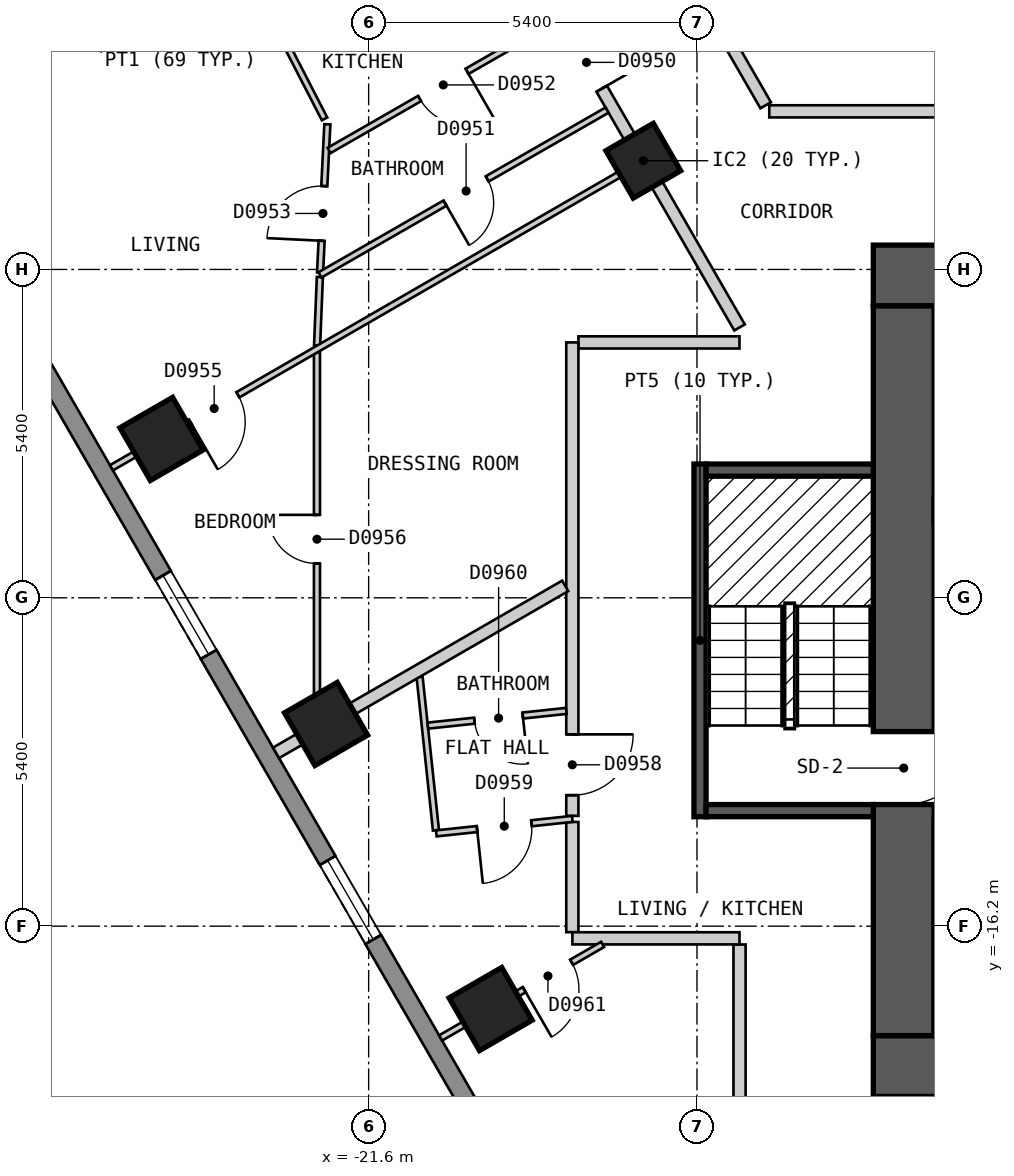
"""IFC4 building model, lengths in metres.
Left out: names, types, materials, properties, quantities, classifications, styles, units other than length and angle.
Written with IfcOpenShell. Run it as: python <this file> out.ifc"""

import sys

from ifc_helpers import new_model, si_unit, direction, frame, frame_2d, origin, origin_2d, place, context, subcontext, project, spatial, polyline, rectangle, outline, extrude, element, fill, save


model = new_model("IFC4")
c1 = context("Model", 3, precision=1e-05, world=origin(), true_north=direction((0.0, 1.0)))
c2 = subcontext(c1, "Body", "Model", "MODEL_VIEW")
j1 = project(units=[si_unit("LENGTHUNIT", "METRE"), si_unit("PLANEANGLEUNIT", "RADIAN")], contexts=[c1])
p1 = place(None, origin())
s1 = spatial("IfcSite", under=j1, at=p1, CompositionType="ELEMENT")
p2 = place(p1, origin())
s2 = spatial("IfcBuilding", under=s1, at=p2, CompositionType="ELEMENT")
p3 = place(p2, frame((0.0, 0.0, 90.0)))
s3 = spatial("IfcBuildingStorey", under=s2, at=p3, CompositionType="ELEMENT", Elevation=90.0)
for number, where, z_axis, x_axis in (
    (1, (-25.007, -8.187, 0.0), (0.0, 0.0, 1.0), (0.5, -0.866, 0.0)),
    (2, (-22.3, -12.875, 0.0), (0.0, 0.0, 1.0), (0.5, -0.866, 0.0)),
    (3, (-19.594, -17.563, 0.0), (0.0, 0.0, 1.0), (0.5, -0.866, 0.0)),
):
    element("IfcColumn", number, at=place(p3, frame(where, z_axis=z_axis, x_axis=x_axis)), inside=s3, PredefinedType="COLUMN", context=c2, shape_type="SweptSolid", body=[
        extrude(rectangle(XDim=1.0, YDim=1.0, at=origin_2d()), origin(), (0.0, 0.0, 1.0), 3.0),
    ])
p4 = place(p3, frame((-17.083, -3.612, 0.0), z_axis=(0.0, 0.0, 1.0), x_axis=(0.5, -0.866025403784, 0.0)))
e4 = element("IfcColumn", 4, at=p4, inside=s3, PredefinedType="COLUMN", context=c2, shape_type="SweptSolid", body=[
    extrude(rectangle(XDim=0.9, YDim=0.9, at=origin_2d()), origin(), (0.0, 0.0, 1.0), 3.0),
])
p5 = place(p3, frame((-13.3, -18.5, 0.0), z_axis=(0.0, 0.0, 1.0), x_axis=(1.0, 0.0, 0.0)))
e5 = element("IfcWall", 5, at=p5, inside=s3, PredefinedType="SHEAR", context=c2, shape_type="SweptSolid", body=[
    extrude(rectangle(XDim=26.6, YDim=1.0, at=frame_2d((13.3, 0.0))), origin(), (0.0, 0.0, 1.0), 2.7),
])
p6 = place(p3, frame((-13.3, -5.5, 0.0), z_axis=(0.0, 0.0, 1.0), x_axis=(1.0, 0.0, 0.0)))
e6 = element("IfcWall", 6, at=p6, inside=s3, PredefinedType="SHEAR", context=c2, shape_type="SweptSolid", body=[
    extrude(rectangle(XDim=26.6, YDim=1.0, at=frame_2d((13.3, 0.0))), origin(), (0.0, 0.0, 1.0), 2.7),
])
p7 = place(p6, frame((23.65, 0.0, 0.0)))
e7 = element("IfcOpeningElement", 7, at=p7, cuts=e6, PredefinedType="OPENING", context=c2, shape_type="SweptSolid", body=[
    extrude(rectangle(XDim=1.2, YDim=2.1, at=frame_2d((0.6, 1.05))), frame((0.0, 0.51, 0.0), z_axis=(0.0, -1.0, 0.0), x_axis=(1.0, 0.0, 0.0)), (0.0, 0.0, 1.0), 1.02),
])
p8 = place(p3, frame((-12.8, -18.0, 0.0), z_axis=(0.0, 0.0, 1.0), x_axis=(0.0, 1.0, 0.0)))
e8 = element("IfcWall", 8, at=p8, inside=s3, PredefinedType="SHEAR", context=c2, shape_type="SweptSolid", body=[
    extrude(rectangle(XDim=12.0, YDim=1.0, at=frame_2d((6.0, 0.0))), origin(), (0.0, 0.0, 1.0), 2.7),
])
p9 = place(p8, frame((3.8, 0.0, 0.0)))
e9 = element("IfcOpeningElement", 9, at=p9, cuts=e8, PredefinedType="OPENING", context=c2, shape_type="SweptSolid", body=[
    extrude(rectangle(XDim=1.2, YDim=2.1, at=frame_2d((0.6, 1.05))), frame((0.0, 0.51, 0.0), z_axis=(0.0, -1.0, 0.0), x_axis=(1.0, 0.0, 0.0)), (0.0, 0.0, 1.0), 1.02),
])
p10 = place(p3, frame((-29.027, -3.425, 0.0), z_axis=(0.0, 0.0, 1.0), x_axis=(0.500035407905, -0.866004960056, 0.0)))
e10 = element("IfcWall", 10, at=p10, inside=s3, PredefinedType="SOLIDWALL", context=c2, shape_type="SweptSolid", body=[
    extrude(outline(polyline([(0.0, -0.15), (23.094, -0.15), (23.014, 0.15), (0.08, 0.15), (0.0, -0.15)])), origin(), (0.0, 0.0, 1.0), 2.7),
])
p11 = place(p10, frame((2.677, 0.0, 0.15)))
e11 = element("IfcOpeningElement", 11, at=p11, cuts=e10, PredefinedType="OPENING", context=c2, shape_type="SweptSolid", body=[
    extrude(rectangle(XDim=1.5, YDim=2.1, at=frame_2d((0.75, 1.05))), frame((0.0, 0.16, 0.0), z_axis=(0.0, -1.0, 0.0), x_axis=(1.0, 0.0, 0.0)), (0.0, 0.0, 1.0), 0.32),
])
p12 = place(p10, frame((8.091, 0.0, 0.15)))
e12 = element("IfcOpeningElement", 12, at=p12, cuts=e10, PredefinedType="OPENING", context=c2, shape_type="SweptSolid", body=[
    extrude(rectangle(XDim=1.5, YDim=2.1, at=frame_2d((0.75, 1.05))), frame((0.0, 0.16, 0.0), z_axis=(0.0, -1.0, 0.0), x_axis=(1.0, 0.0, 0.0)), (0.0, 0.0, 1.0), 0.32),
])
p13 = place(p10, frame((13.504, 0.0, 0.15)))
e13 = element("IfcOpeningElement", 13, at=p13, cuts=e10, PredefinedType="OPENING", context=c2, shape_type="SweptSolid", body=[
    extrude(rectangle(XDim=1.5, YDim=2.1, at=frame_2d((0.75, 1.05))), frame((0.0, 0.16, 0.0), z_axis=(0.0, -1.0, 0.0), x_axis=(1.0, 0.0, 0.0)), (0.0, 0.0, 1.0), 0.32),
])
p14 = place(p10, frame((18.917, 0.0, 0.15)))
e14 = element("IfcOpeningElement", 14, at=p14, cuts=e10, PredefinedType="OPENING", context=c2, shape_type="SweptSolid", body=[
    extrude(rectangle(XDim=1.5, YDim=2.1, at=frame_2d((0.75, 1.05))), frame((0.0, 0.16, 0.0), z_axis=(0.0, -1.0, 0.0), x_axis=(1.0, 0.0, 0.0)), (0.0, 0.0, 1.0), 0.32),
])
p15 = place(p3, frame((-15.993, -1.101, 0.0), z_axis=(0.0, 0.0, 1.0), x_axis=(0.499894174133, -0.866086493757, 0.0)))
e15 = element("IfcWall", 15, at=p15, inside=s3, PredefinedType="PARTITIONING", context=c2, shape_type="SweptSolid", body=[
    extrude(rectangle(XDim=1.846, YDim=0.2, at=frame_2d((0.923, 0.0))), origin(), (0.0, 0.0, 1.0), 2.7),
])
p16 = place(p3, frame((-18.533, -1.101, 0.0), z_axis=(0.0, 0.0, 1.0), x_axis=(0.500022085096, -0.866012652573, 0.0)))
e16 = element("IfcWall", 16, at=p16, inside=s3, PredefinedType="PARTITIONING", context=c2, shape_type="SweptSolid", body=[
    extrude(rectangle(XDim=6.066, YDim=0.2, at=frame_2d((3.033, 0.0))), origin(), (0.0, 0.0, 1.0), 2.7),
])
p17 = place(p16, frame((0.532, 0.0, 0.0)))
e17 = element("IfcOpeningElement", 17, at=p17, cuts=e16, PredefinedType="OPENING", context=c2, shape_type="SweptSolid", body=[
    extrude(rectangle(XDim=1.0, YDim=2.1, at=frame_2d((0.5, 1.05))), frame((0.0, 0.11, 0.0), z_axis=(0.0, -1.0, 0.0), x_axis=(1.0, 0.0, 0.0)), (0.0, 0.0, 1.0), 0.22),
])
p18 = place(p3, frame((-15.5, -16.501, 0.0), z_axis=(0.0, 0.0, 1.0), x_axis=(0.0, -1.0, 0.0)))
e18 = element("IfcWall", 18, at=p18, inside=s3, PredefinedType="PARTITIONING", context=c2, shape_type="SweptSolid", body=[
    extrude(rectangle(XDim=4.598, YDim=0.2, at=frame_2d((2.299, 0.0))), origin(), (0.0, 0.0, 1.0), 2.7),
])
p19 = place(p3, frame((-18.25, -14.486, 0.0), z_axis=(0.0, 0.0, 1.0), x_axis=(0.0, -1.0, 0.0)))
e19 = element("IfcWall", 19, at=p19, inside=s3, PredefinedType="PARTITIONING", context=c2, shape_type="SweptSolid", body=[
    extrude(rectangle(XDim=1.813, YDim=0.2, at=frame_2d((0.906, 0.0))), origin(), (0.0, 0.0, 1.0), 2.7),
])
p20 = place(p3, frame((-18.15, -6.6, 0.0), z_axis=(0.0, 0.0, 1.0), x_axis=(1.0, 0.0, 0.0)))
e20 = element("IfcWall", 20, at=p20, inside=s3, PredefinedType="PARTITIONING", context=c2, shape_type="SweptSolid", body=[
    extrude(rectangle(XDim=2.649, YDim=0.2, at=frame_2d((1.324, 0.0))), origin(), (0.0, 0.0, 1.0), 2.7),
])
p21 = place(p3, frame((-18.249, -16.4, 0.0), z_axis=(0.0, 0.0, 1.0), x_axis=(1.0, 0.0, 0.0)))
e21 = element("IfcWall", 21, at=p21, inside=s3, PredefinedType="PARTITIONING", context=c2, shape_type="SweptSolid", body=[
    extrude(rectangle(XDim=2.748, YDim=0.2, at=frame_2d((1.374, 0.0))), origin(), (0.0, 0.0, 1.0), 2.7),
])
p22 = place(p3, frame((-15.011, -2.8, 0.0), z_axis=(0.0, 0.0, 1.0), x_axis=(1.0, 0.0, 0.0)))
e22 = element("IfcWall", 22, at=p22, inside=s3, PredefinedType="PARTITIONING", context=c2, shape_type="SweptSolid", body=[
    extrude(rectangle(XDim=7.982, YDim=0.2, at=frame_2d((3.991, 0.0))), origin(), (0.0, 0.0, 1.0), 2.7),
])
p23 = place(p3, frame((-18.25, -14.386, 0.0), z_axis=(0.0, 0.0, 1.0), x_axis=(0.0, 1.0, 0.0)))
e23 = element("IfcWall", 23, at=p23, inside=s3, PredefinedType="PARTITIONING", context=c2, shape_type="SweptSolid", body=[
    extrude(rectangle(XDim=7.786, YDim=0.2, at=frame_2d((3.893, 0.0))), origin(), (0.0, 0.0, 1.0), 2.7),
])
p24 = place(p23, frame((0.34, 0.0, 0.0)))
e24 = element("IfcOpeningElement", 24, at=p24, cuts=e23, PredefinedType="OPENING", context=c2, shape_type="SweptSolid", body=[
    extrude(rectangle(XDim=1.0, YDim=2.1, at=frame_2d((0.5, 1.05))), frame((0.0, 0.11, 0.0), z_axis=(0.0, -1.0, 0.0), x_axis=(1.0, 0.0, 0.0)), (0.0, 0.0, 1.0), 0.22),
])
p25 = place(p3, frame((-23.289, -1.054, 0.0), z_axis=(0.0, 0.0, 1.0), x_axis=(0.458226112305, -0.888835659726, 0.0)))
e25 = element("IfcWall", 25, at=p25, inside=s3, PredefinedType="PARTITIONING", context=c2, shape_type="SweptSolid", body=[
    extrude(rectangle(XDim=2.104, YDim=0.1, at=frame_2d((1.052, 0.0))), origin(), (0.0, 0.0, 1.0), 2.7),
])
p26 = place(p3, frame((-20.762, -12.102, 0.0), z_axis=(0.0, 0.0, 1.0), x_axis=(0.106118300401, -0.994353511745, 0.0)))
e26 = element("IfcWall", 26, at=p26, inside=s3, PredefinedType="PARTITIONING", context=c2, shape_type="SweptSolid", body=[
    extrude(rectangle(XDim=2.535, YDim=0.1, at=frame_2d((1.268, 0.0))), origin(), (0.0, 0.0, 1.0), 2.7),
])
p27 = place(p3, frame((-20.626, -12.902, 0.0), z_axis=(0.0, 0.0, 1.0), x_axis=(0.994385570266, 0.105817473257, 0.0)))
e27 = element("IfcWall", 27, at=p27, inside=s3, PredefinedType="PARTITIONING", context=c2, shape_type="SweptSolid", body=[
    extrude(rectangle(XDim=2.289, YDim=0.1, at=frame_2d((1.145, 0.0))), origin(), (0.0, 0.0, 1.0), 2.7),
])
p28 = place(p27, frame((0.77, 0.0, 0.0)))
e28 = element("IfcOpeningElement", 28, at=p28, cuts=e27, PredefinedType="OPENING", context=c2, shape_type="SweptSolid", body=[
    extrude(rectangle(XDim=0.8, YDim=2.1, at=frame_2d((0.4, 1.05))), frame((0.0, 0.06, 0.0), z_axis=(0.0, -1.0, 0.0), x_axis=(1.0, 0.0, 0.0)), (0.0, 0.0, 1.0), 0.12),
])
p29 = place(p3, frame((-20.487, -14.674, 0.0), z_axis=(0.0, 0.0, 1.0), x_axis=(0.994386484046, 0.105808885948, 0.0)))
e29 = element("IfcWall", 29, at=p29, inside=s3, PredefinedType="PARTITIONING", context=c2, shape_type="SweptSolid", body=[
    extrude(rectangle(XDim=2.25, YDim=0.1, at=frame_2d((1.125, 0.0))), origin(), (0.0, 0.0, 1.0), 2.7),
])
p30 = place(p29, frame((0.674, 0.0, 0.0)))
e30 = element("IfcOpeningElement", 30, at=p30, cuts=e29, PredefinedType="OPENING", context=c2, shape_type="SweptSolid", body=[
    extrude(rectangle(XDim=0.9, YDim=2.1, at=frame_2d((0.45, 1.05))), frame((0.0, 0.06, 0.0), z_axis=(0.0, -1.0, 0.0), x_axis=(1.0, 0.0, 0.0)), (0.0, 0.0, 1.0), 0.12),
])
p31 = place(p3, frame((-22.399, -5.45, 0.0), z_axis=(0.0, 0.0, 1.0), x_axis=(0.049129140995, 0.998792434646, 0.0)))
e31 = element("IfcWall", 31, at=p31, inside=s3, PredefinedType="PARTITIONING", context=c2, shape_type="SweptSolid", body=[
    extrude(rectangle(XDim=2.44, YDim=0.1, at=frame_2d((1.22, 0.0))), origin(), (0.0, 0.0, 1.0), 2.7),
])
p32 = place(p31, frame((0.522, 0.0, 0.0)))
e32 = element("IfcOpeningElement", 32, at=p32, cuts=e31, PredefinedType="OPENING", context=c2, shape_type="SweptSolid", body=[
    extrude(rectangle(XDim=0.9, YDim=2.1, at=frame_2d((0.45, 1.05))), frame((0.0, 0.06, 0.0), z_axis=(0.0, -1.0, 0.0), x_axis=(1.0, 0.0, 0.0)), (0.0, 0.0, 1.0), 0.12),
])
p33 = place(p3, frame((-22.448, -6.651, 0.0), z_axis=(0.0, 0.0, 1.0), x_axis=(0.040729401597, 0.99917021365, 0.0)))
e33 = element("IfcWall", 33, at=p33, inside=s3, PredefinedType="PARTITIONING", context=c2, shape_type="SweptSolid", body=[
    extrude(rectangle(XDim=1.127, YDim=0.1, at=frame_2d((0.563, 0.0))), origin(), (0.0, 0.0, 1.0), 2.7),
])
p34 = place(p3, frame((-22.45, -12.846, 0.0), z_axis=(0.0, 0.0, 1.0), x_axis=(0.0, 1.0, 0.0)))
e34 = element("IfcWall", 34, at=p34, inside=s3, PredefinedType="PARTITIONING", context=c2, shape_type="SweptSolid", body=[
    extrude(rectangle(XDim=6.078, YDim=0.1, at=frame_2d((3.039, 0.0))), origin(), (0.0, 0.0, 1.0), 2.7),
])
p35 = place(p34, frame((2.61, 0.0, 0.0)))
e35 = element("IfcOpeningElement", 35, at=p35, cuts=e34, PredefinedType="OPENING", context=c2, shape_type="SweptSolid", body=[
    extrude(rectangle(XDim=0.8, YDim=2.1, at=frame_2d((0.4, 1.05))), frame((0.0, 0.06, 0.0), z_axis=(0.0, -1.0, 0.0), x_axis=(1.0, 0.0, 0.0)), (0.0, 0.0, 1.0), 0.12),
])
p36 = place(p3, frame((-20.416, -18.038, 0.0), z_axis=(0.0, 0.0, 1.0), x_axis=(0.866026989333, 0.499997253739, 0.0)))
e36 = element("IfcWall", 36, at=p36, inside=s3, PredefinedType="PARTITIONING", context=c2, shape_type="SweptSolid", body=[
    extrude(rectangle(XDim=3.076, YDim=0.1, at=frame_2d((1.538, 0.0))), origin(), (0.0, 0.0, 1.0), 2.7),
])
p37 = place(p36, frame((1.588, 0.0, 0.0)))
e37 = element("IfcOpeningElement", 37, at=p37, cuts=e36, PredefinedType="OPENING", context=c2, shape_type="SweptSolid", body=[
    extrude(rectangle(XDim=0.9, YDim=2.1, at=frame_2d((0.45, 1.05))), frame((0.0, 0.06, 0.0), z_axis=(0.0, -1.0, 0.0), x_axis=(1.0, 0.0, 0.0)), (0.0, 0.0, 1.0), 0.12),
])
p38 = place(p3, frame((-25.83, -8.662, 0.0), z_axis=(0.0, 0.0, 1.0), x_axis=(0.866022959057, 0.500004234368, 0.0)))
e38 = element("IfcWall", 38, at=p38, inside=s3, PredefinedType="PARTITIONING", context=c2, shape_type="SweptSolid", body=[
    extrude(rectangle(XDim=10.0, YDim=0.1, at=frame_2d((5.0, 0.0))), origin(), (0.0, 0.0, 1.0), 2.7),
])
p39 = place(p38, frame((1.501, 0.0, 0.0)))
e39 = element("IfcOpeningElement", 39, at=p39, cuts=e38, PredefinedType="OPENING", context=c2, shape_type="SweptSolid", body=[
    extrude(rectangle(XDim=0.9, YDim=2.1, at=frame_2d((0.45, 1.05))), frame((0.0, 0.06, 0.0), z_axis=(0.0, -1.0, 0.0), x_axis=(1.0, 0.0, 0.0)), (0.0, 0.0, 1.0), 0.12),
])
p40 = place(p3, frame((-22.401, -5.49, 0.0), z_axis=(0.0, 0.0, 1.0), x_axis=(0.867314404256, 0.497760709749, 0.0)))
e40 = element("IfcWall", 40, at=p40, inside=s3, PredefinedType="PARTITIONING", context=c2, shape_type="SweptSolid", body=[
    extrude(rectangle(XDim=5.444, YDim=0.1, at=frame_2d((2.722, 0.0))), origin(), (0.0, 0.0, 1.0), 2.7),
])
p41 = place(p40, frame((2.372, 0.0, 0.0)))
e41 = element("IfcOpeningElement", 41, at=p41, cuts=e40, PredefinedType="OPENING", context=c2, shape_type="SweptSolid", body=[
    extrude(rectangle(XDim=0.8, YDim=2.1, at=frame_2d((0.4, 1.05))), frame((0.0, 0.06, 0.0), z_axis=(0.0, -1.0, 0.0), x_axis=(1.0, 0.0, 0.0)), (0.0, 0.0, 1.0), 0.12),
])
p42 = place(p3, frame((-22.25, -3.443, 0.0), z_axis=(0.0, 0.0, 1.0), x_axis=(0.867362741349, 0.497676476156, 0.0)))
e42 = element("IfcWall", 42, at=p42, inside=s3, PredefinedType="PARTITIONING", context=c2, shape_type="SweptSolid", body=[
    extrude(rectangle(XDim=4.29, YDim=0.1, at=frame_2d((2.145, 0.0))), origin(), (0.0, 0.0, 1.0), 2.7),
])
p43 = place(p42, frame((1.715, 0.0, 0.0)))
e43 = element("IfcOpeningElement", 43, at=p43, cuts=e42, PredefinedType="OPENING", context=c2, shape_type="SweptSolid", body=[
    extrude(rectangle(XDim=0.9, YDim=2.1, at=frame_2d((0.45, 1.05))), frame((0.0, 0.06, 0.0), z_axis=(0.0, -1.0, 0.0), x_axis=(1.0, 0.0, 0.0)), (0.0, 0.0, 1.0), 0.12),
])
p44 = place(p3, frame((-23.123, -13.35, 0.0), z_axis=(0.0, 0.0, 1.0), x_axis=(0.866013095437, 0.500021318078, 0.0)))
e44 = element("IfcWall", 44, at=p44, inside=s3, PredefinedType="PARTITIONING", context=c2, shape_type="SweptSolid", body=[
    extrude(rectangle(XDim=5.492, YDim=0.2, at=frame_2d((2.746, 0.0))), origin(), (0.0, 0.0, 1.0), 2.7),
])
p45 = place(p3, frame((-16.15, -14.4, 0.0), z_axis=(0.0, 0.0, 1.0), x_axis=(0.0, 1.0, 0.0)))
e45 = element("IfcWall", 45, at=p45, inside=s3, PredefinedType="SOLIDWALL", context=c2, shape_type="SweptSolid", body=[
    extrude(rectangle(XDim=5.8, YDim=0.2, at=frame_2d((2.9, 0.0))), origin(), (0.0, 0.0, 1.0), 2.7),
])
for number, where, z_axis, x_axis in (
    (46, (-16.05, -14.3, 0.0), (0.0, 0.0, 1.0), (1.0, 0.0, 0.0)),
    (47, (-16.05, -8.7, 0.0), (0.0, 0.0, 1.0), (1.0, 0.0, 0.0)),
):
    element("IfcWall", number, at=place(p3, frame(where, z_axis=z_axis, x_axis=x_axis)), inside=s3, PredefinedType="SOLIDWALL", context=c2, shape_type="SweptSolid", body=[
        extrude(rectangle(XDim=2.75, YDim=0.2, at=frame_2d((1.375, 0.0))), origin(), (0.0, 0.0, 1.0), 2.7),
    ])
p46 = place(p12, origin())
e48 = element("IfcWindow", 48, at=p46, inside=s3, PartitioningType="SINGLE_PANEL", PredefinedType="WINDOW", context=c2, shape_type="SweptSolid", body=[
    extrude(rectangle(XDim=1.5, YDim=2.1, at=frame_2d((0.75, 1.05))), frame((0.0, 0.03, 0.0), z_axis=(0.0, -1.0, 0.0), x_axis=(1.0, 0.0, 0.0)), (0.0, 0.0, 1.0), 0.06),
])
fill(e12, e48)
p47 = place(p13, origin())
e49 = element("IfcWindow", 49, at=p47, inside=s3, PartitioningType="SINGLE_PANEL", PredefinedType="WINDOW", context=c2, shape_type="SweptSolid", body=[
    extrude(rectangle(XDim=1.5, YDim=2.1, at=frame_2d((0.75, 1.05))), frame((0.0, 0.03, 0.0), z_axis=(0.0, -1.0, 0.0), x_axis=(1.0, 0.0, 0.0)), (0.0, 0.0, 1.0), 0.06),
])
fill(e13, e49)
p48 = place(p17, origin())
e50 = element("IfcDoor", 50, at=p48, inside=s3, OperationType="SINGLE_SWING_RIGHT", PredefinedType="DOOR", context=c2, shape_type="SweptSolid", body=[
    extrude(rectangle(XDim=1.0, YDim=2.1, at=frame_2d((0.5, 1.05))), frame((0.0, 0.025, 0.0), z_axis=(0.0, -1.0, 0.0), x_axis=(1.0, 0.0, 0.0)), (0.0, 0.0, 1.0), 0.05),
])
fill(e17, e50)
p49 = place(p41, origin())
e51 = element("IfcDoor", 51, at=p49, inside=s3, OperationType="SINGLE_SWING_LEFT", PredefinedType="DOOR", context=c2, shape_type="SweptSolid", body=[
    extrude(rectangle(XDim=0.8, YDim=2.1, at=frame_2d((0.4, 1.05))), frame((0.0, 0.025, 0.0), z_axis=(0.0, -1.0, 0.0), x_axis=(1.0, 0.0, 0.0)), (0.0, 0.0, 1.0), 0.05),
])
fill(e41, e51)
p50 = place(p43, origin())
e52 = element("IfcDoor", 52, at=p50, inside=s3, OperationType="SINGLE_SWING_RIGHT", PredefinedType="DOOR", context=c2, shape_type="SweptSolid", body=[
    extrude(rectangle(XDim=0.9, YDim=2.1, at=frame_2d((0.45, 1.05))), frame((0.0, 0.025, 0.0), z_axis=(0.0, -1.0, 0.0), x_axis=(1.0, 0.0, 0.0)), (0.0, 0.0, 1.0), 0.05),
])
fill(e43, e52)
p51 = place(p32, origin())
e53 = element("IfcDoor", 53, at=p51, inside=s3, OperationType="SINGLE_SWING_LEFT", PredefinedType="DOOR", context=c2, shape_type="SweptSolid", body=[
    extrude(rectangle(XDim=0.9, YDim=2.1, at=frame_2d((0.45, 1.05))), frame((0.0, 0.025, 0.0), z_axis=(0.0, -1.0, 0.0), x_axis=(1.0, 0.0, 0.0)), (0.0, 0.0, 1.0), 0.05),
])
fill(e32, e53)
p52 = place(p39, origin())
e54 = element("IfcDoor", 54, at=p52, inside=s3, OperationType="SINGLE_SWING_LEFT", PredefinedType="DOOR", context=c2, shape_type="SweptSolid", body=[
    extrude(rectangle(XDim=0.9, YDim=2.1, at=frame_2d((0.45, 1.05))), frame((0.0, 0.025, 0.0), z_axis=(0.0, -1.0, 0.0), x_axis=(1.0, 0.0, 0.0)), (0.0, 0.0, 1.0), 0.05),
])
fill(e39, e54)
p53 = place(p35, origin())
e55 = element("IfcDoor", 55, at=p53, inside=s3, OperationType="SINGLE_SWING_RIGHT", PredefinedType="DOOR", context=c2, shape_type="SweptSolid", body=[
    extrude(rectangle(XDim=0.8, YDim=2.1, at=frame_2d((0.4, 1.05))), frame((0.0, 0.025, 0.0), z_axis=(0.0, -1.0, 0.0), x_axis=(1.0, 0.0, 0.0)), (0.0, 0.0, 1.0), 0.05),
])
fill(e35, e55)
p54 = place(p24, origin())
e56 = element("IfcDoor", 56, at=p54, inside=s3, OperationType="SINGLE_SWING_RIGHT", PredefinedType="DOOR", context=c2, shape_type="SweptSolid", body=[
    extrude(rectangle(XDim=1.0, YDim=2.1, at=frame_2d((0.5, 1.05))), frame((0.0, 0.025, 0.0), z_axis=(0.0, -1.0, 0.0), x_axis=(1.0, 0.0, 0.0)), (0.0, 0.0, 1.0), 0.05),
])
fill(e24, e56)
p55 = place(p30, origin())
e57 = element("IfcDoor", 57, at=p55, inside=s3, OperationType="SINGLE_SWING_LEFT", PredefinedType="DOOR", context=c2, shape_type="SweptSolid", body=[
    extrude(rectangle(XDim=0.9, YDim=2.1, at=frame_2d((0.45, 1.05))), frame((0.0, 0.025, 0.0), z_axis=(0.0, -1.0, 0.0), x_axis=(1.0, 0.0, 0.0)), (0.0, 0.0, 1.0), 0.05),
])
fill(e30, e57)
p56 = place(p28, origin())
e58 = element("IfcDoor", 58, at=p56, inside=s3, OperationType="SINGLE_SWING_RIGHT", PredefinedType="DOOR", context=c2, shape_type="SweptSolid", body=[
    extrude(rectangle(XDim=0.8, YDim=2.1, at=frame_2d((0.4, 1.05))), frame((0.0, 0.025, 0.0), z_axis=(0.0, -1.0, 0.0), x_axis=(1.0, 0.0, 0.0)), (0.0, 0.0, 1.0), 0.05),
])
fill(e28, e58)
p57 = place(p37, origin())
e59 = element("IfcDoor", 59, at=p57, inside=s3, OperationType="SINGLE_SWING_LEFT", PredefinedType="DOOR", context=c2, shape_type="SweptSolid", body=[
    extrude(rectangle(XDim=0.9, YDim=2.1, at=frame_2d((0.45, 1.05))), frame((0.0, 0.025, 0.0), z_axis=(0.0, -1.0, 0.0), x_axis=(1.0, 0.0, 0.0)), (0.0, 0.0, 1.0), 0.05),
])
fill(e37, e59)
p58 = place(p9, origin())
e60 = element("IfcDoor", 60, at=p58, inside=s3, OperationType="SINGLE_SWING_RIGHT", PredefinedType="DOOR", context=c2, shape_type="SweptSolid", body=[
    extrude(rectangle(XDim=1.2, YDim=2.1, at=frame_2d((0.6, 1.05))), frame((0.0, 0.025, 0.0), z_axis=(0.0, -1.0, 0.0), x_axis=(1.0, 0.0, 0.0)), (0.0, 0.0, 1.0), 0.05),
])
fill(e9, e60)
save(model, sys.argv[1])
